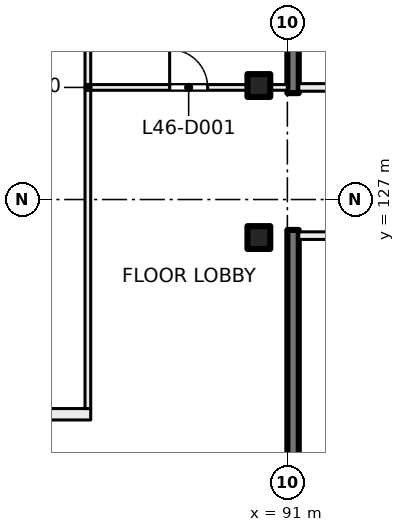
"""IFC4 building model, lengths in metres.
Left out: names, types, materials, properties, quantities, classifications, styles, units other than length and angle.
Written with IfcOpenShell. Run it as: python <this file> out.ifc"""

import sys

from ifc_helpers import new_model, si_unit, direction, frame, frame_2d, origin, origin_2d, place, context, subcontext, project, spatial, rectangle, extrude, element, fill, save


model = new_model("IFC4")
c1 = context("Model", 3, precision=1e-05, world=origin(), true_north=direction((0.0, 1.0)))
c2 = subcontext(c1, "Body", "Model", "MODEL_VIEW")
j1 = project(units=[si_unit("LENGTHUNIT", "METRE"), si_unit("PLANEANGLEUNIT", "RADIAN")], contexts=[c1])
p1 = place(None, origin())
s1 = spatial("IfcSite", under=j1, at=p1, CompositionType="ELEMENT")
p2 = place(p1, origin())
s2 = spatial("IfcBuilding", under=s1, at=p2, CompositionType="ELEMENT")
p3 = place(p2, frame((0.0, 0.0, 196.0)))
s3 = spatial("IfcBuildingStorey", under=s2, at=p3, CompositionType="ELEMENT", Elevation=196.0)
for number, where, z_axis, x_axis in (
    (1, (90.25, 130.0, 0.0), (0.0, 0.0, 1.0), (1.0, 0.0, 0.0)),
    (2, (90.25, 126.0, 0.0), (0.0, 0.0, 1.0), (1.0, 0.0, 0.0)),
):
    element("IfcColumn", number, at=place(p3, frame(where, z_axis=z_axis, x_axis=x_axis)), inside=s3, PredefinedType="COLUMN", context=c2, shape_type="SweptSolid", body=[
        extrude(rectangle(XDim=0.6, YDim=0.6, at=origin_2d()), origin(), (0.0, 0.0, 1.0), 4.0),
    ])
for number, where, z_axis, x_axis in (
    (3, (91.15, 138.5, 0.0), (0.0, 0.0, 1.0), (0.0, -1.0, 0.0)),
    (4, (91.15, 126.2, 0.0), (0.0, 0.0, 1.0), (0.0, -1.0, 0.0)),
):
    element("IfcWall", number, at=place(p3, frame(where, z_axis=z_axis, x_axis=x_axis)), inside=s3, PredefinedType="SHEAR", context=c2, shape_type="SweptSolid", body=[
        extrude(rectangle(XDim=8.7, YDim=0.3, at=frame_2d((4.35, 0.0))), origin(), (0.0, 0.0, 1.0), 4.0),
    ])
p4 = place(p3, frame((95.25, 126.05, 0.0), z_axis=(0.0, 0.0, 1.0), x_axis=(-1.0, 0.0, 0.0)))
e5 = element("IfcWall", 5, at=p4, inside=s3, PredefinedType="PARTITIONING", context=c2, shape_type="SweptSolid", body=[
    extrude(rectangle(XDim=3.95, YDim=0.2, at=frame_2d((1.975, 0.0))), origin(), (0.0, 0.0, 1.0), 3.625),
])
p5 = place(p4, frame((0.3, 0.0, 0.0)))
e6 = element("IfcOpeningElement", 6, at=p5, cuts=e5, PredefinedType="OPENING", context=c2, shape_type="SweptSolid", body=[
    extrude(rectangle(XDim=1.2, YDim=2.1, at=frame_2d((0.6, 1.05))), frame((0.0, 0.11, 0.0), z_axis=(0.0, -1.0, 0.0), x_axis=(1.0, 0.0, 0.0)), (0.0, 0.0, 1.0), 0.22),
])
p6 = place(p3, frame((91.3, 129.95, 0.0), z_axis=(0.0, 0.0, 1.0), x_axis=(1.0, 0.0, 0.0)))
e7 = element("IfcWall", 7, at=p6, inside=s3, PredefinedType="PARTITIONING", context=c2, shape_type="SweptSolid", body=[
    extrude(rectangle(XDim=3.95, YDim=0.2, at=frame_2d((1.975, 0.0))), origin(), (0.0, 0.0, 1.0), 3.625),
])
p7 = place(p6, frame((2.45, 0.0, 0.0)))
e8 = element("IfcOpeningElement", 8, at=p7, cuts=e7, PredefinedType="OPENING", context=c2, shape_type="SweptSolid", body=[
    extrude(rectangle(XDim=1.2, YDim=2.1, at=frame_2d((0.6, 1.05))), frame((0.0, 0.11, 0.0), z_axis=(0.0, -1.0, 0.0), x_axis=(1.0, 0.0, 0.0)), (0.0, 0.0, 1.0), 0.22),
])
p8 = place(p3, frame((50.506, 121.35, 0.0), z_axis=(0.0, 0.0, 1.0), x_axis=(1.0, 0.0, 0.0)))
e9 = element("IfcWall", 9, at=p8, inside=s3, PredefinedType="PARTITIONING", context=c2, shape_type="SweptSolid", body=[
    extrude(rectangle(XDim=35.319, YDim=0.3, at=frame_2d((17.659, 0.0))), origin(), (0.0, 0.0, 1.0), 3.625),
])
p9 = place(p8, frame((21.244, 0.0, 0.0)))
e10 = element("IfcOpeningElement", 10, at=p9, cuts=e9, PredefinedType="OPENING", context=c2, shape_type="SweptSolid", body=[
    extrude(rectangle(XDim=1.0, YDim=2.1, at=frame_2d((0.5, 1.05))), frame((0.0, 0.16, 0.0), z_axis=(0.0, -1.0, 0.0), x_axis=(1.0, 0.0, 0.0)), (0.0, 0.0, 1.0), 0.32),
])
p10 = place(p8, frame((29.844, 0.0, 0.0)))
e11 = element("IfcOpeningElement", 11, at=p10, cuts=e9, PredefinedType="OPENING", context=c2, shape_type="SweptSolid", body=[
    extrude(rectangle(XDim=1.8, YDim=2.1, at=frame_2d((0.9, 1.05))), frame((0.0, 0.16, 0.0), z_axis=(0.0, -1.0, 0.0), x_axis=(1.0, 0.0, 0.0)), (0.0, 0.0, 1.0), 0.32),
])
p11 = place(p8, frame((9.594, 0.0, 0.0)))
e12 = element("IfcOpeningElement", 12, at=p11, cuts=e9, PredefinedType="OPENING", context=c2, shape_type="SweptSolid", body=[
    extrude(rectangle(XDim=1.8, YDim=2.1, at=frame_2d((0.9, 1.05))), frame((0.0, 0.16, 0.0), z_axis=(0.0, -1.0, 0.0), x_axis=(1.0, 0.0, 0.0)), (0.0, 0.0, 1.0), 0.32),
])
p12 = place(p8, frame((1.047, 0.0, 0.0)))
e13 = element("IfcOpeningElement", 13, at=p12, cuts=e9, PredefinedType="OPENING", context=c2, shape_type="SweptSolid", body=[
    extrude(rectangle(XDim=1.8, YDim=2.1, at=frame_2d((0.9, 1.05))), frame((0.0, 0.16, 0.0), z_axis=(0.0, -1.0, 0.0), x_axis=(1.0, 0.0, 0.0)), (0.0, 0.0, 1.0), 0.32),
])
p13 = place(p3, frame((85.75, 121.5, 0.0), z_axis=(0.0, 0.0, 1.0), x_axis=(0.0, 1.0, 0.0)))
e14 = element("IfcWall", 14, at=p13, inside=s3, PredefinedType="PARTITIONING", context=c2, shape_type="SweptSolid", body=[
    extrude(rectangle(XDim=16.9, YDim=0.15, at=frame_2d((8.45, 0.0))), origin(), (0.0, 0.0, 1.0), 3.625),
])
p14 = place(p3, frame((85.825, 129.95, 0.0), z_axis=(0.0, 0.0, 1.0), x_axis=(1.0, 0.0, 0.0)))
e15 = element("IfcWall", 15, at=p14, inside=s3, PredefinedType="PARTITIONING", context=c2, shape_type="SweptSolid", body=[
    extrude(rectangle(XDim=5.175, YDim=0.15, at=frame_2d((2.587, 0.0))), origin(), (0.0, 0.0, 1.0), 3.625),
])
p15 = place(p14, frame((2.077, 0.0, 0.0)))
e16 = element("IfcOpeningElement", 16, at=p15, cuts=e15, PredefinedType="OPENING", context=c2, shape_type="SweptSolid", body=[
    extrude(rectangle(XDim=1.0, YDim=2.1, at=frame_2d((0.5, 1.05))), frame((0.0, 0.085, 0.0), z_axis=(0.0, -1.0, 0.0), x_axis=(1.0, 0.0, 0.0)), (0.0, 0.0, 1.0), 0.17),
])
p16 = place(p15, origin())
e17 = element("IfcDoor", 17, at=p16, inside=s3, OperationType="SINGLE_SWING_LEFT", PredefinedType="DOOR", context=c2, shape_type="SweptSolid", body=[
    extrude(rectangle(XDim=1.0, YDim=2.1, at=frame_2d((0.5, 1.05))), frame((0.0, 0.025, 0.0), z_axis=(0.0, -1.0, 0.0), x_axis=(1.0, 0.0, 0.0)), (0.0, 0.0, 1.0), 0.05),
])
fill(e16, e17)
save(model, sys.argv[1])
